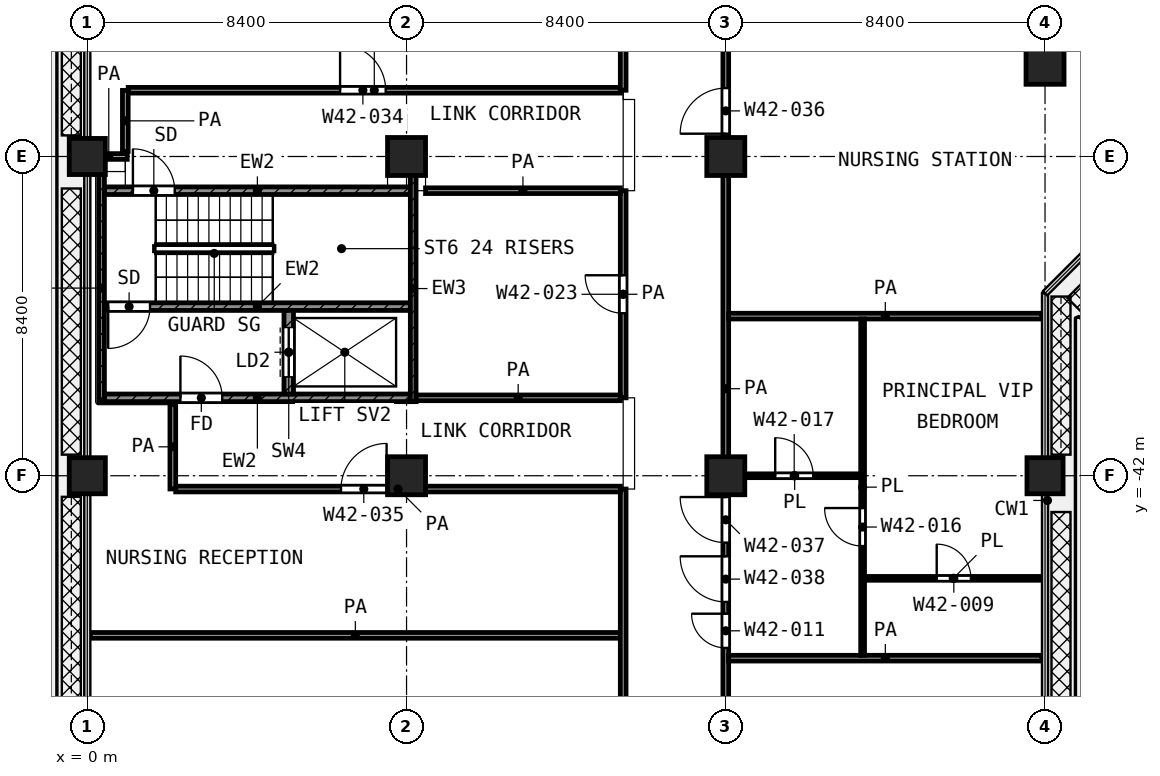
"""IFC4 building model, lengths in metres.
Left out: names, types, materials, properties, quantities, classifications, styles, units other than length and angle.
Written with IfcOpenShell. Run it as: python <this file> out.ifc"""

import sys

from ifc_helpers import new_model, si_unit, direction, frame, frame_2d, origin, origin_2d, place, context, subcontext, project, spatial, rectangle, extrude, element, fill, save


model = new_model("IFC4")
c1 = context("Model", 3, precision=1e-05, world=origin(), true_north=direction((0.0, 1.0)))
c2 = subcontext(c1, "Body", "Model", "MODEL_VIEW")
j1 = project(units=[si_unit("LENGTHUNIT", "METRE"), si_unit("PLANEANGLEUNIT", "RADIAN")], contexts=[c1])
p1 = place(None, origin())
s1 = spatial("IfcSite", under=j1, at=p1, CompositionType="ELEMENT")
p2 = place(p1, origin())
s2 = spatial("IfcBuilding", under=s1, at=p2, CompositionType="ELEMENT")
p3 = place(p2, frame((0.0, 0.0, 204.6)))
s3 = spatial("IfcBuildingStorey", under=s2, at=p3, CompositionType="ELEMENT", Elevation=204.6)
p4 = place(p3, frame((25.2, -31.2, 0.0), z_axis=(0.0, 0.0, 1.0), x_axis=(1.0, 0.0, 0.0)))
e1 = element("IfcColumn", 1, at=p4, inside=s3, PredefinedType="COLUMN", context=c2, shape_type="SweptSolid", body=[
    extrude(rectangle(XDim=1.0, YDim=1.0, at=origin_2d()), origin(), (0.0, 0.0, 1.0), 4.2),
])
p5 = place(p3, frame((0.0, -33.6, 0.0), z_axis=(0.0, 0.0, 1.0), x_axis=(1.0, 0.0, 0.0)))
e2 = element("IfcColumn", 2, at=p5, inside=s3, PredefinedType="COLUMN", context=c2, shape_type="SweptSolid", body=[
    extrude(rectangle(XDim=0.95, YDim=0.95, at=origin_2d()), origin(), (0.0, 0.0, 1.0), 4.2),
])
for number, where, z_axis, x_axis in (
    (3, (8.4, -33.6, 0.0), (0.0, 0.0, 1.0), (1.0, 0.0, 0.0)),
    (4, (16.8, -33.6, 0.0), (0.0, 0.0, 1.0), (1.0, 0.0, 0.0)),
):
    element("IfcColumn", number, at=place(p3, frame(where, z_axis=z_axis, x_axis=x_axis)), inside=s3, PredefinedType="COLUMN", context=c2, shape_type="SweptSolid", body=[
        extrude(rectangle(XDim=1.0, YDim=1.0, at=origin_2d()), origin(), (0.0, 0.0, 1.0), 4.2),
    ])
p6 = place(p3, frame((0.0, -42.0, 0.0), z_axis=(0.0, 0.0, 1.0), x_axis=(1.0, 0.0, 0.0)))
e5 = element("IfcColumn", 5, at=p6, inside=s3, PredefinedType="COLUMN", context=c2, shape_type="SweptSolid", body=[
    extrude(rectangle(XDim=0.95, YDim=0.95, at=origin_2d()), origin(), (0.0, 0.0, 1.0), 4.2),
])
for number, where, z_axis, x_axis in (
    (6, (8.4, -42.0, 0.0), (0.0, 0.0, 1.0), (1.0, 0.0, 0.0)),
    (7, (16.8, -42.0, 0.0), (0.0, 0.0, 1.0), (1.0, 0.0, 0.0)),
):
    element("IfcColumn", number, at=place(p3, frame(where, z_axis=z_axis, x_axis=x_axis)), inside=s3, PredefinedType="COLUMN", context=c2, shape_type="SweptSolid", body=[
        extrude(rectangle(XDim=1.0, YDim=1.0, at=origin_2d()), origin(), (0.0, 0.0, 1.0), 4.2),
    ])
p7 = place(p3, frame((25.2, -42.0, 0.0), z_axis=(0.0, 0.0, 1.0), x_axis=(1.0, 0.0, 0.0)))
e8 = element("IfcColumn", 8, at=p7, inside=s3, PredefinedType="COLUMN", context=c2, shape_type="SweptSolid", body=[
    extrude(rectangle(XDim=0.95, YDim=0.95, at=origin_2d()), origin(), (0.0, 0.0, 1.0), 4.2),
])
p8 = place(p3, frame((0.375, -40.05, 0.0), z_axis=(0.0, 0.0, 1.0), x_axis=(0.0, 1.0, 0.0)))
e9 = element("IfcWall", 9, at=p8, inside=s3, PredefinedType="SHEAR", context=c2, shape_type="SweptSolid", body=[
    extrude(rectangle(XDim=5.975, YDim=0.15, at=frame_2d((2.988, 0.0))), origin(), (0.0, 0.0, 1.0), 3.6),
])
p9 = place(p3, frame((8.575, -40.05, 0.0), z_axis=(0.0, 0.0, 1.0), x_axis=(0.0, 1.0, 0.0)))
e10 = element("IfcWall", 10, at=p9, inside=s3, PredefinedType="SHEAR", context=c2, shape_type="SweptSolid", body=[
    extrude(rectangle(XDim=5.95, YDim=0.15, at=frame_2d((2.975, 0.0))), origin(), (0.0, 0.0, 1.0), 3.6),
])
p10 = place(p3, frame((0.45, -34.5, 0.0), z_axis=(0.0, 0.0, 1.0), x_axis=(1.0, 0.0, 0.0)))
e11 = element("IfcWall", 11, at=p10, inside=s3, PredefinedType="SHEAR", context=c2, shape_type="SweptSolid", body=[
    extrude(rectangle(XDim=8.05, YDim=0.2, at=frame_2d((4.025, 0.0))), origin(), (0.0, 0.0, 1.0), 3.6),
])
p11 = place(p10, frame((0.75, 0.0, 0.0)))
e12 = element("IfcOpeningElement", 12, at=p11, cuts=e11, PredefinedType="OPENING", context=c2, shape_type="SweptSolid", body=[
    extrude(rectangle(XDim=1.1, YDim=2.1, at=frame_2d((0.55, 1.05))), frame((0.0, 0.11, 0.0), z_axis=(0.0, -1.0, 0.0), x_axis=(1.0, 0.0, 0.0)), (0.0, 0.0, 1.0), 0.22),
])
p12 = place(p3, frame((0.45, -37.55, 0.0), z_axis=(0.0, 0.0, 1.0), x_axis=(1.0, 0.0, 0.0)))
e13 = element("IfcWall", 13, at=p12, inside=s3, PredefinedType="SHEAR", context=c2, shape_type="SweptSolid", body=[
    extrude(rectangle(XDim=8.05, YDim=0.2, at=frame_2d((4.025, 0.0))), origin(), (0.0, 0.0, 1.0), 3.6),
])
p13 = place(p12, frame((0.1, 0.0, 0.0)))
e14 = element("IfcOpeningElement", 14, at=p13, cuts=e13, PredefinedType="OPENING", context=c2, shape_type="SweptSolid", body=[
    extrude(rectangle(XDim=1.1, YDim=2.1, at=frame_2d((0.55, 1.05))), frame((0.0, 0.11, 0.0), z_axis=(0.0, -1.0, 0.0), x_axis=(1.0, 0.0, 0.0)), (0.0, 0.0, 1.0), 0.22),
])
p14 = place(p3, frame((0.45, -39.95, 0.0), z_axis=(0.0, 0.0, 1.0), x_axis=(1.0, 0.0, 0.0)))
e15 = element("IfcWall", 15, at=p14, inside=s3, PredefinedType="SHEAR", context=c2, shape_type="SweptSolid", body=[
    extrude(rectangle(XDim=8.05, YDim=0.2, at=frame_2d((4.025, 0.0))), origin(), (0.0, 0.0, 1.0), 3.6),
])
p15 = place(p14, frame((2.0, 0.0, 0.0)))
e16 = element("IfcOpeningElement", 16, at=p15, cuts=e15, PredefinedType="OPENING", context=c2, shape_type="SweptSolid", body=[
    extrude(rectangle(XDim=1.1, YDim=2.1, at=frame_2d((0.55, 1.05))), frame((0.0, 0.11, 0.0), z_axis=(0.0, -1.0, 0.0), x_axis=(1.0, 0.0, 0.0)), (0.0, 0.0, 1.0), 0.22),
])
p16 = place(p3, frame((5.3, -39.85, 0.0), z_axis=(0.0, 0.0, 1.0), x_axis=(0.0, 1.0, 0.0)))
e17 = element("IfcWall", 17, at=p16, inside=s3, PredefinedType="SHEAR", context=c2, shape_type="SweptSolid", body=[
    extrude(rectangle(XDim=2.2, YDim=0.25, at=frame_2d((1.1, 0.0))), origin(), (0.0, 0.0, 1.0), 3.6),
])
p17 = place(p16, frame((0.45, 0.0, 0.0)))
e18 = element("IfcOpeningElement", 18, at=p17, cuts=e17, PredefinedType="OPENING", context=c2, shape_type="SweptSolid", body=[
    extrude(rectangle(XDim=1.3, YDim=2.1, at=frame_2d((0.65, 1.05))), frame((0.0, 0.135, 0.0), z_axis=(0.0, -1.0, 0.0), x_axis=(1.0, 0.0, 0.0)), (0.0, 0.0, 1.0), 0.27),
])
p18 = place(p3, frame((20.45, -44.7, 0.0), z_axis=(0.0, 0.0, 1.0), x_axis=(1.0, 0.0, 0.0)))
e19 = element("IfcWall", 19, at=p18, inside=s3, PredefinedType="PARTITIONING", context=c2, shape_type="SweptSolid", body=[
    extrude(rectangle(XDim=4.67, YDim=0.1, at=frame_2d((2.335, 0.0))), origin(), (0.0, 0.0, 1.0), 3.6),
])
p19 = place(p18, frame((1.9, 0.0, 0.0)))
e20 = element("IfcOpeningElement", 20, at=p19, cuts=e19, PredefinedType="OPENING", context=c2, shape_type="SweptSolid", body=[
    extrude(rectangle(XDim=0.9, YDim=2.1, at=frame_2d((0.45, 1.05))), frame((0.0, 0.06, 0.0), z_axis=(0.0, -1.0, 0.0), x_axis=(1.0, 0.0, 0.0)), (0.0, 0.0, 1.0), 0.12),
])
p20 = place(p3, frame((16.875, -42.0, 0.0), z_axis=(0.0, 0.0, 1.0), x_axis=(1.0, 0.0, 0.0)))
e21 = element("IfcWall", 21, at=p20, inside=s3, PredefinedType="PARTITIONING", context=c2, shape_type="SweptSolid", body=[
    extrude(rectangle(XDim=3.475, YDim=0.1, at=frame_2d((1.738, 0.0))), origin(), (0.0, 0.0, 1.0), 3.6),
])
p21 = place(p20, frame((1.225, 0.0, 0.0)))
e22 = element("IfcOpeningElement", 22, at=p21, cuts=e21, PredefinedType="OPENING", context=c2, shape_type="SweptSolid", body=[
    extrude(rectangle(XDim=1.0, YDim=2.1, at=frame_2d((0.5, 1.05))), frame((0.0, 0.06, 0.0), z_axis=(0.0, -1.0, 0.0), x_axis=(1.0, 0.0, 0.0)), (0.0, 0.0, 1.0), 0.12),
])
p22 = place(p3, frame((20.4, -46.725, 0.0), z_axis=(0.0, 0.0, 1.0), x_axis=(0.0, 1.0, 0.0)))
e23 = element("IfcWall", 23, at=p22, inside=s3, PredefinedType="PARTITIONING", context=c2, shape_type="SweptSolid", body=[
    extrude(rectangle(XDim=8.85, YDim=0.1, at=frame_2d((4.425, 0.0))), origin(), (0.0, 0.0, 1.0), 3.6),
])
p23 = place(p22, frame((2.875, 0.0, 0.0)))
e24 = element("IfcOpeningElement", 24, at=p23, cuts=e23, PredefinedType="OPENING", context=c2, shape_type="SweptSolid", body=[
    extrude(rectangle(XDim=1.0, YDim=2.1, at=frame_2d((0.5, 1.05))), frame((0.0, 0.06, 0.0), z_axis=(0.0, -1.0, 0.0), x_axis=(1.0, 0.0, 0.0)), (0.0, 0.0, 1.0), 0.12),
])
p24 = place(p3, frame((16.875, -46.8, 0.0), z_axis=(0.0, 0.0, 1.0), x_axis=(1.0, 0.0, 0.0)))
e25 = element("IfcWall", 25, at=p24, inside=s3, PredefinedType="PARTITIONING", context=c2, shape_type="SweptSolid", body=[
    extrude(rectangle(XDim=8.245, YDim=0.15, at=frame_2d((4.123, 0.0))), origin(), (0.0, 0.0, 1.0), 3.6),
])
p25 = place(p3, frame((0.08, -46.2, 0.0), z_axis=(0.0, 0.0, 1.0), x_axis=(1.0, 0.0, 0.0)))
e26 = element("IfcWall", 26, at=p25, inside=s3, PredefinedType="PARTITIONING", context=c2, shape_type="SweptSolid", body=[
    extrude(rectangle(XDim=13.945, YDim=0.15, at=frame_2d((6.972, 0.0))), origin(), (0.0, 0.0, 1.0), 3.6),
])
p26 = place(p3, frame((2.326, -42.35, 0.0), z_axis=(0.0, 0.0, 1.0), x_axis=(1.0, 0.0, 0.0)))
e27 = element("IfcWall", 27, at=p26, inside=s3, PredefinedType="PARTITIONING", context=c2, shape_type="SweptSolid", body=[
    extrude(rectangle(XDim=11.699, YDim=0.15, at=frame_2d((5.85, 0.0))), origin(), (0.0, 0.0, 1.0), 3.6),
])
p27 = place(p26, frame((4.349, 0.0, 0.0)))
e28 = element("IfcOpeningElement", 28, at=p27, cuts=e27, PredefinedType="OPENING", context=c2, shape_type="SweptSolid", body=[
    extrude(rectangle(XDim=1.2, YDim=2.1, at=frame_2d((0.6, 1.05))), frame((0.0, 0.085, 0.0), z_axis=(0.0, -1.0, 0.0), x_axis=(1.0, 0.0, 0.0)), (0.0, 0.0, 1.0), 0.17),
])
p28 = place(p3, frame((8.65, -39.95, 0.0), z_axis=(0.0, 0.0, 1.0), x_axis=(1.0, 0.0, 0.0)))
e29 = element("IfcWall", 29, at=p28, inside=s3, PredefinedType="PARTITIONING", context=c2, shape_type="SweptSolid", body=[
    extrude(rectangle(XDim=5.375, YDim=0.15, at=frame_2d((2.688, 0.0))), origin(), (0.0, 0.0, 1.0), 3.6),
])
p29 = place(p3, frame((16.875, -37.8, 0.0), z_axis=(0.0, 0.0, 1.0), x_axis=(1.0, 0.0, 0.0)))
e30 = element("IfcWall", 30, at=p29, inside=s3, PredefinedType="PARTITIONING", context=c2, shape_type="SweptSolid", body=[
    extrude(rectangle(XDim=8.245, YDim=0.15, at=frame_2d((4.123, 0.0))), origin(), (0.0, 0.0, 1.0), 3.6),
])
p30 = place(p3, frame((8.9, -34.5, 0.0), z_axis=(0.0, 0.0, 1.0), x_axis=(1.0, 0.0, 0.0)))
e31 = element("IfcWall", 31, at=p30, inside=s3, PredefinedType="PARTITIONING", context=c2, shape_type="SweptSolid", body=[
    extrude(rectangle(XDim=5.125, YDim=0.15, at=frame_2d((2.562, 0.0))), origin(), (0.0, 0.0, 1.0), 3.6),
])
p31 = place(p3, frame((0.08, -33.6, 0.0), z_axis=(0.0, 0.0, 1.0), x_axis=(1.0, 0.0, 0.0)))
e32 = element("IfcWall", 32, at=p31, inside=s3, PredefinedType="PARTITIONING", context=c2, shape_type="SweptSolid", body=[
    extrude(rectangle(XDim=0.97, YDim=0.15, at=frame_2d((0.485, 0.0))), origin(), (0.0, 0.0, 1.0), 3.6),
])
p32 = place(p3, frame((1.077, -31.857, 0.0), z_axis=(0.0, 0.0, 1.0), x_axis=(1.0, 0.0, 0.0)))
e33 = element("IfcWall", 33, at=p32, inside=s3, PredefinedType="PARTITIONING", context=c2, shape_type="SweptSolid", body=[
    extrude(rectangle(XDim=12.948, YDim=0.15, at=frame_2d((6.474, 0.0))), origin(), (0.0, 0.0, 1.0), 3.6),
])
p33 = place(p32, frame((5.574, 0.0, 0.0)))
e34 = element("IfcOpeningElement", 34, at=p33, cuts=e33, PredefinedType="OPENING", context=c2, shape_type="SweptSolid", body=[
    extrude(rectangle(XDim=1.2, YDim=2.1, at=frame_2d((0.6, 1.05))), frame((0.0, 0.085, 0.0), z_axis=(0.0, -1.0, 0.0), x_axis=(1.0, 0.0, 0.0)), (0.0, 0.0, 1.0), 0.17),
])
p34 = place(p3, frame((1.0, -33.465, 0.0), z_axis=(0.0, 0.0, 1.0), x_axis=(0.0, 1.0, 0.0)))
e35 = element("IfcWall", 35, at=p34, inside=s3, PredefinedType="PARTITIONING", context=c2, shape_type="SweptSolid", body=[
    extrude(rectangle(XDim=1.606, YDim=0.15, at=frame_2d((0.803, 0.0))), origin(), (0.0, 0.0, 1.0), 3.6),
])
p35 = place(p3, frame((2.25, -42.348, 0.0), z_axis=(0.0, 0.0, 1.0), x_axis=(0.0, 1.0, 0.0)))
e36 = element("IfcWall", 36, at=p35, inside=s3, PredefinedType="PARTITIONING", context=c2, shape_type="SweptSolid", body=[
    extrude(rectangle(XDim=2.218, YDim=0.15, at=frame_2d((1.109, 0.0))), origin(), (0.0, 0.0, 1.0), 3.6),
])
p36 = place(p3, frame((14.1, -54.52, 0.0), z_axis=(0.0, 0.0, 1.0), x_axis=(0.0, 1.0, 0.0)))
e37 = element("IfcWall", 37, at=p36, inside=s3, PredefinedType="PARTITIONING", context=c2, shape_type="SweptSolid", body=[
    extrude(rectangle(XDim=12.17, YDim=0.15, at=frame_2d((6.085, 0.0))), origin(), (0.0, 0.0, 1.0), 3.6),
])
p37 = place(p36, frame((3.37, 0.0, 0.0)))
e38 = element("IfcOpeningElement", 38, at=p37, cuts=e37, PredefinedType="OPENING", context=c2, shape_type="SweptSolid", body=[
    extrude(rectangle(XDim=1.5, YDim=2.1, at=frame_2d((0.75, 1.05))), frame((0.0, 0.085, 0.0), z_axis=(0.0, -1.0, 0.0), x_axis=(1.0, 0.0, 0.0)), (0.0, 0.0, 1.0), 0.17),
])
p38 = place(p3, frame((14.1, -39.95, 0.0), z_axis=(0.0, 0.0, 1.0), x_axis=(0.0, 1.0, 0.0)))
e39 = element("IfcWall", 39, at=p38, inside=s3, PredefinedType="PARTITIONING", context=c2, shape_type="SweptSolid", body=[
    extrude(rectangle(XDim=5.45, YDim=0.15, at=frame_2d((2.725, 0.0))), origin(), (0.0, 0.0, 1.0), 3.6),
])
p39 = place(p38, frame((2.225, 0.0, 0.0)))
e40 = element("IfcOpeningElement", 40, at=p39, cuts=e39, PredefinedType="OPENING", context=c2, shape_type="SweptSolid", body=[
    extrude(rectangle(XDim=1.0, YDim=2.1, at=frame_2d((0.5, 1.05))), frame((0.0, 0.085, 0.0), z_axis=(0.0, -1.0, 0.0), x_axis=(1.0, 0.0, 0.0)), (0.0, 0.0, 1.0), 0.17),
])
p40 = place(p3, frame((14.1, -31.857, 0.0), z_axis=(0.0, 0.0, 1.0), x_axis=(0.0, 1.0, 0.0)))
e41 = element("IfcWall", 41, at=p40, inside=s3, PredefinedType="PARTITIONING", context=c2, shape_type="SweptSolid", body=[
    extrude(rectangle(XDim=2.457, YDim=0.15, at=frame_2d((1.229, 0.0))), origin(), (0.0, 0.0, 1.0), 3.6),
])
p41 = place(p3, frame((16.8, -54.52, 0.0), z_axis=(0.0, 0.0, 1.0), x_axis=(0.0, 1.0, 0.0)))
e42 = element("IfcWall", 42, at=p41, inside=s3, PredefinedType="PARTITIONING", context=c2, shape_type="SweptSolid", body=[
    extrude(rectangle(XDim=29.62, YDim=0.15, at=frame_2d((14.81, 0.0))), origin(), (0.0, 0.0, 1.0), 3.6),
])
p42 = place(p41, frame((21.52, 0.0, 0.0)))
e43 = element("IfcOpeningElement", 43, at=p42, cuts=e42, PredefinedType="OPENING", context=c2, shape_type="SweptSolid", body=[
    extrude(rectangle(XDim=1.2, YDim=2.1, at=frame_2d((0.6, 1.05))), frame((0.0, 0.085, 0.0), z_axis=(0.0, -1.0, 0.0), x_axis=(1.0, 0.0, 0.0)), (0.0, 0.0, 1.0), 0.17),
])
p43 = place(p41, frame((10.76, 0.0, 0.0)))
e44 = element("IfcOpeningElement", 44, at=p43, cuts=e42, PredefinedType="OPENING", context=c2, shape_type="SweptSolid", body=[
    extrude(rectangle(XDim=1.2, YDim=2.1, at=frame_2d((0.6, 1.05))), frame((0.0, 0.085, 0.0), z_axis=(0.0, -1.0, 0.0), x_axis=(1.0, 0.0, 0.0)), (0.0, 0.0, 1.0), 0.17),
])
p44 = place(p41, frame((9.2, 0.0, 0.0)))
e45 = element("IfcOpeningElement", 45, at=p44, cuts=e42, PredefinedType="OPENING", context=c2, shape_type="SweptSolid", body=[
    extrude(rectangle(XDim=1.2, YDim=2.1, at=frame_2d((0.6, 1.05))), frame((0.0, 0.085, 0.0), z_axis=(0.0, -1.0, 0.0), x_axis=(1.0, 0.0, 0.0)), (0.0, 0.0, 1.0), 0.17),
])
p45 = place(p41, frame((7.99, 0.0, 0.0)))
e46 = element("IfcOpeningElement", 46, at=p45, cuts=e42, PredefinedType="OPENING", context=c2, shape_type="SweptSolid", body=[
    extrude(rectangle(XDim=0.9, YDim=2.1, at=frame_2d((0.45, 1.05))), frame((0.0, 0.085, 0.0), z_axis=(0.0, -1.0, 0.0), x_axis=(1.0, 0.0, 0.0)), (0.0, 0.0, 1.0), 0.17),
])
p46 = place(p41, frame((2.07, 0.0, 0.0)))
e47 = element("IfcOpeningElement", 47, at=p46, cuts=e42, PredefinedType="OPENING", context=c2, shape_type="SweptSolid", body=[
    extrude(rectangle(XDim=1.5, YDim=2.1, at=frame_2d((0.75, 1.05))), frame((0.0, 0.085, 0.0), z_axis=(0.0, -1.0, 0.0), x_axis=(1.0, 0.0, 0.0)), (0.0, 0.0, 1.0), 0.17),
])
p47 = place(p11, origin())
e48 = element("IfcDoor", 48, at=p47, inside=s3, OperationType="SINGLE_SWING_LEFT", PredefinedType="DOOR", context=c2, shape_type="SweptSolid", body=[
    extrude(rectangle(XDim=1.1, YDim=2.1, at=frame_2d((0.55, 1.05))), frame((0.0, 0.025, 0.0), z_axis=(0.0, -1.0, 0.0), x_axis=(1.0, 0.0, 0.0)), (0.0, 0.0, 1.0), 0.05),
])
fill(e12, e48)
p48 = place(p13, frame((1.1, 0.0, 0.0), z_axis=(0.0, 0.0, 1.0), x_axis=(-1.0, 0.0, 0.0)))
e49 = element("IfcDoor", 49, at=p48, inside=s3, OperationType="SINGLE_SWING_LEFT", PredefinedType="DOOR", context=c2, shape_type="SweptSolid", body=[
    extrude(rectangle(XDim=1.1, YDim=2.1, at=frame_2d((0.55, 1.05))), frame((0.0, 0.025, 0.0), z_axis=(0.0, -1.0, 0.0), x_axis=(1.0, 0.0, 0.0)), (0.0, 0.0, 1.0), 0.05),
])
fill(e14, e49)
p49 = place(p17, origin())
e50 = element("IfcDoor", 50, at=p49, inside=s3, OperationType="DOUBLE_DOOR_SLIDING", PredefinedType="DOOR", context=c2, shape_type="SweptSolid", body=[
    extrude(rectangle(XDim=1.3, YDim=2.1, at=frame_2d((0.65, 1.05))), frame((0.0, 0.025, 0.0), z_axis=(0.0, -1.0, 0.0), x_axis=(1.0, 0.0, 0.0)), (0.0, 0.0, 1.0), 0.05),
])
fill(e18, e50)
p50 = place(p15, origin())
e51 = element("IfcDoor", 51, at=p50, inside=s3, OperationType="SINGLE_SWING_LEFT", PredefinedType="DOOR", context=c2, shape_type="SweptSolid", body=[
    extrude(rectangle(XDim=1.1, YDim=2.1, at=frame_2d((0.55, 1.05))), frame((0.0, 0.025, 0.0), z_axis=(0.0, -1.0, 0.0), x_axis=(1.0, 0.0, 0.0)), (0.0, 0.0, 1.0), 0.05),
])
fill(e16, e51)
p51 = place(p33, origin())
e52 = element("IfcDoor", 52, at=p51, inside=s3, OperationType="SINGLE_SWING_LEFT", PredefinedType="DOOR", context=c2, shape_type="SweptSolid", body=[
    extrude(rectangle(XDim=1.2, YDim=2.1, at=frame_2d((0.6, 1.05))), frame((0.0, 0.025, 0.0), z_axis=(0.0, -1.0, 0.0), x_axis=(1.0, 0.0, 0.0)), (0.0, 0.0, 1.0), 0.05),
])
fill(e34, e52)
p52 = place(p39, origin())
e53 = element("IfcDoor", 53, at=p52, inside=s3, OperationType="SINGLE_SWING_RIGHT", PredefinedType="DOOR", context=c2, shape_type="SweptSolid", body=[
    extrude(rectangle(XDim=1.0, YDim=2.1, at=frame_2d((0.5, 1.05))), frame((0.0, 0.025, 0.0), z_axis=(0.0, -1.0, 0.0), x_axis=(1.0, 0.0, 0.0)), (0.0, 0.0, 1.0), 0.05),
])
fill(e40, e53)
p53 = place(p27, origin())
e54 = element("IfcDoor", 54, at=p53, inside=s3, OperationType="SINGLE_SWING_RIGHT", PredefinedType="DOOR", context=c2, shape_type="SweptSolid", body=[
    extrude(rectangle(XDim=1.2, YDim=2.1, at=frame_2d((0.6, 1.05))), frame((0.0, 0.025, 0.0), z_axis=(0.0, -1.0, 0.0), x_axis=(1.0, 0.0, 0.0)), (0.0, 0.0, 1.0), 0.05),
])
fill(e28, e54)
p54 = place(p42, origin())
e55 = element("IfcDoor", 55, at=p54, inside=s3, OperationType="SINGLE_SWING_LEFT", PredefinedType="DOOR", context=c2, shape_type="SweptSolid", body=[
    extrude(rectangle(XDim=1.2, YDim=2.1, at=frame_2d((0.6, 1.05))), frame((0.0, 0.025, 0.0), z_axis=(0.0, -1.0, 0.0), x_axis=(1.0, 0.0, 0.0)), (0.0, 0.0, 1.0), 0.05),
])
fill(e43, e55)
p55 = place(p43, origin())
e56 = element("IfcDoor", 56, at=p55, inside=s3, OperationType="SINGLE_SWING_RIGHT", PredefinedType="DOOR", context=c2, shape_type="SweptSolid", body=[
    extrude(rectangle(XDim=1.2, YDim=2.1, at=frame_2d((0.6, 1.05))), frame((0.0, 0.025, 0.0), z_axis=(0.0, -1.0, 0.0), x_axis=(1.0, 0.0, 0.0)), (0.0, 0.0, 1.0), 0.05),
])
fill(e44, e56)
p56 = place(p44, origin())
e57 = element("IfcDoor", 57, at=p56, inside=s3, OperationType="SINGLE_SWING_RIGHT", PredefinedType="DOOR", context=c2, shape_type="SweptSolid", body=[
    extrude(rectangle(XDim=1.2, YDim=2.1, at=frame_2d((0.6, 1.05))), frame((0.0, 0.025, 0.0), z_axis=(0.0, -1.0, 0.0), x_axis=(1.0, 0.0, 0.0)), (0.0, 0.0, 1.0), 0.05),
])
fill(e45, e57)
p57 = place(p45, origin())
e58 = element("IfcDoor", 58, at=p57, inside=s3, OperationType="SINGLE_SWING_RIGHT", PredefinedType="DOOR", context=c2, shape_type="SweptSolid", body=[
    extrude(rectangle(XDim=0.9, YDim=2.1, at=frame_2d((0.45, 1.05))), frame((0.0, 0.025, 0.0), z_axis=(0.0, -1.0, 0.0), x_axis=(1.0, 0.0, 0.0)), (0.0, 0.0, 1.0), 0.05),
])
fill(e46, e58)
p58 = place(p23, origin())
e59 = element("IfcDoor", 59, at=p58, inside=s3, OperationType="SINGLE_SWING_RIGHT", PredefinedType="DOOR", context=c2, shape_type="SweptSolid", body=[
    extrude(rectangle(XDim=1.0, YDim=2.1, at=frame_2d((0.5, 1.05))), frame((0.0, 0.025, 0.0), z_axis=(0.0, -1.0, 0.0), x_axis=(1.0, 0.0, 0.0)), (0.0, 0.0, 1.0), 0.05),
])
fill(e24, e59)
p59 = place(p21, origin())
e60 = element("IfcDoor", 60, at=p59, inside=s3, OperationType="SINGLE_SWING_LEFT", PredefinedType="DOOR", context=c2, shape_type="SweptSolid", body=[
    extrude(rectangle(XDim=1.0, YDim=2.1, at=frame_2d((0.5, 1.05))), frame((0.0, 0.025, 0.0), z_axis=(0.0, -1.0, 0.0), x_axis=(1.0, 0.0, 0.0)), (0.0, 0.0, 1.0), 0.05),
])
fill(e22, e60)
p60 = place(p19, origin())
e61 = element("IfcDoor", 61, at=p60, inside=s3, OperationType="SINGLE_SWING_LEFT", PredefinedType="DOOR", context=c2, shape_type="SweptSolid", body=[
    extrude(rectangle(XDim=0.9, YDim=2.1, at=frame_2d((0.45, 1.05))), frame((0.0, 0.025, 0.0), z_axis=(0.0, -1.0, 0.0), x_axis=(1.0, 0.0, 0.0)), (0.0, 0.0, 1.0), 0.05),
])
fill(e20, e61)
save(model, sys.argv[1])
